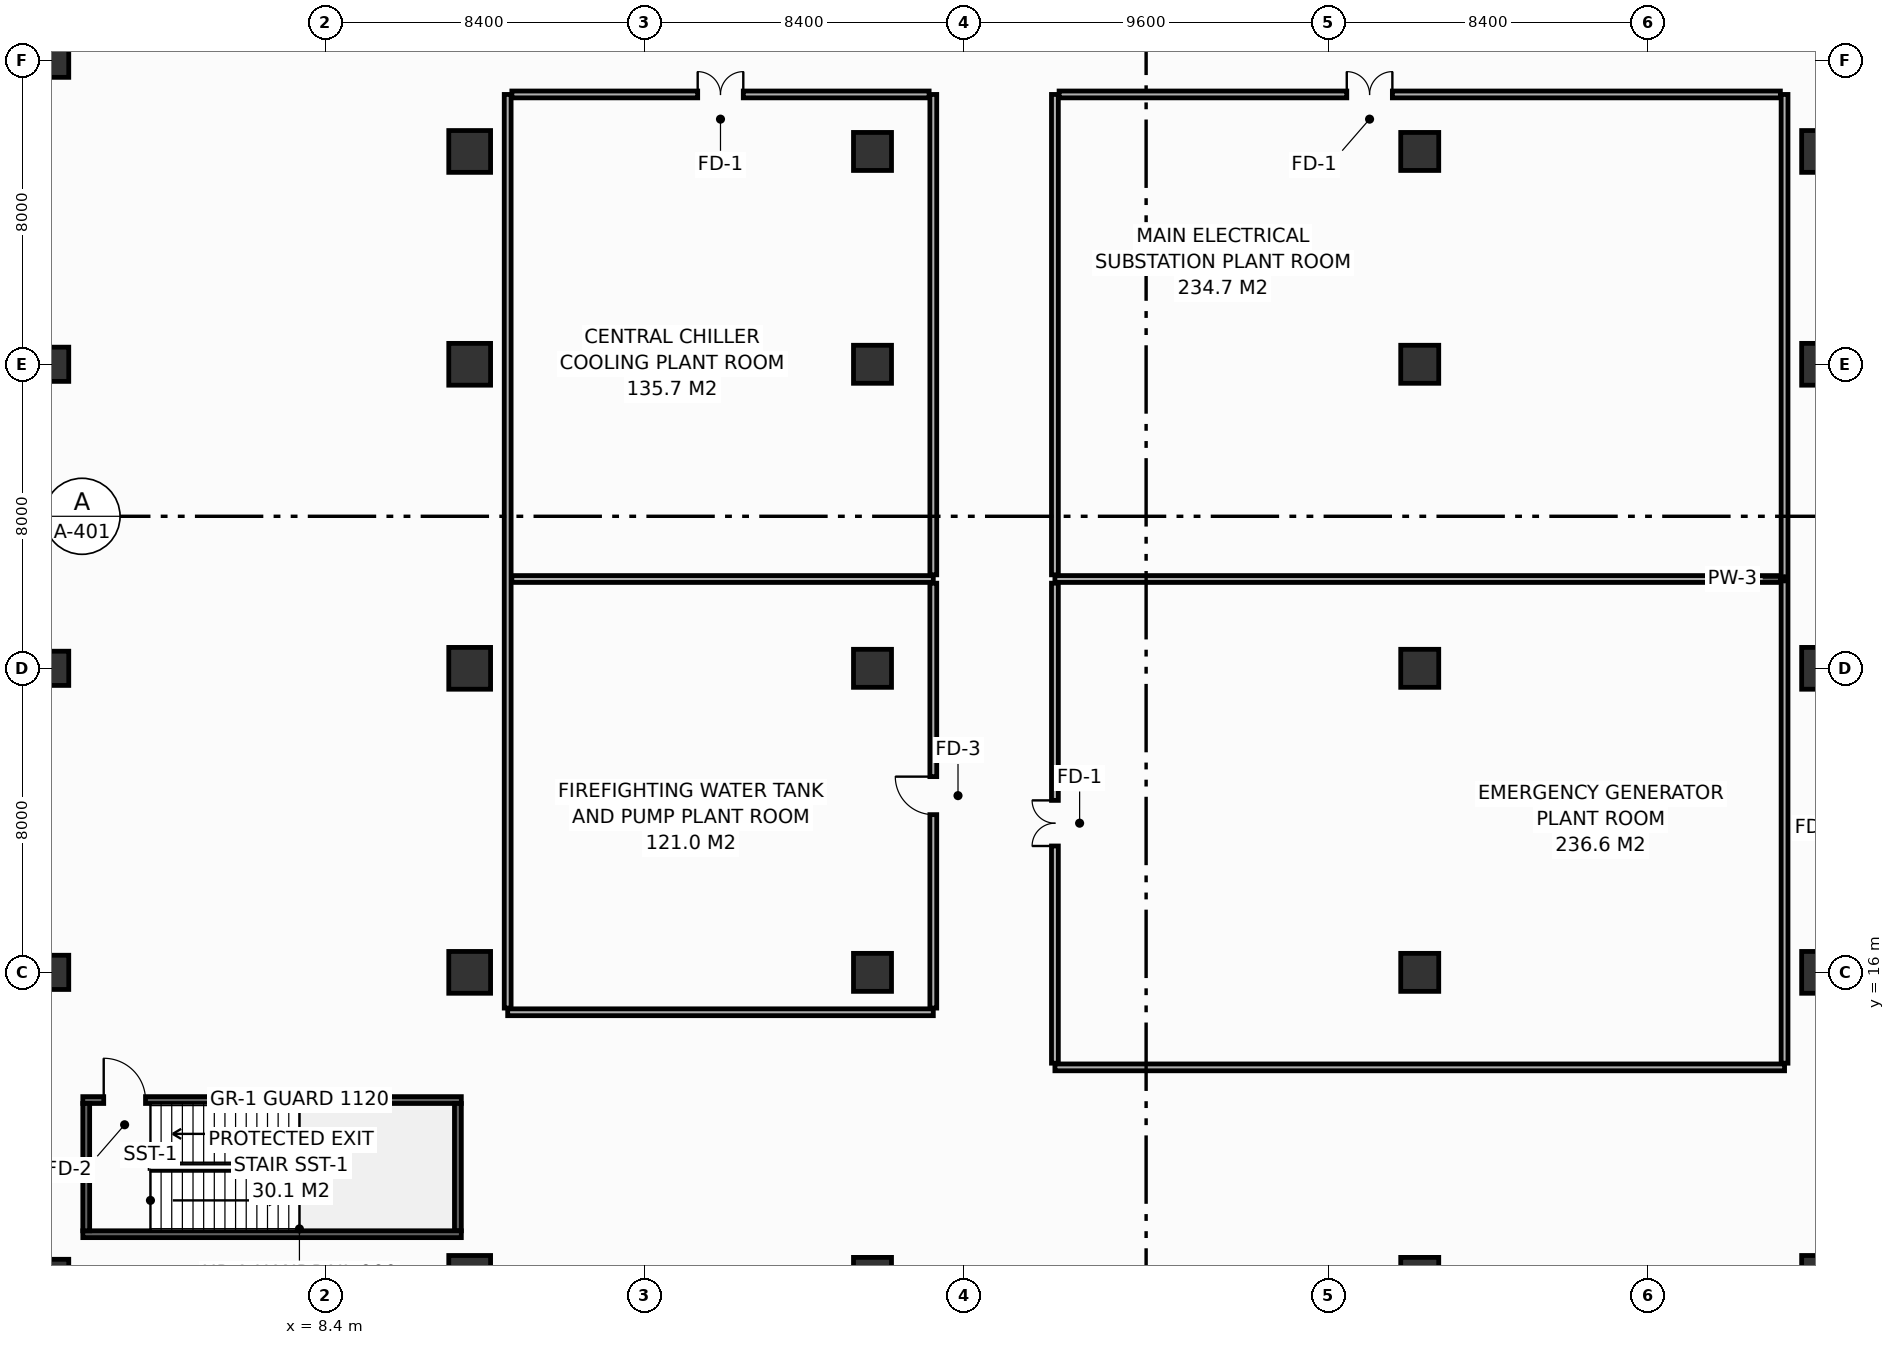
"""IFC4 building model, lengths in metres.
Left out: names, types, materials, properties, quantities, classifications, styles, units other than length and angle.
Written with IfcOpenShell. Run it as: python <this file> out.ifc"""

import sys

from ifc_helpers import new_model, si_unit, direction, frame, frame_2d, origin, origin_2d, place, context, subcontext, project, spatial, rectangle, extrude, element, fill, save


model = new_model("IFC4")
c1 = context("Model", 3, precision=1e-05, world=origin(), true_north=direction((0.0, 1.0)))
c2 = subcontext(c1, "Body", "Model", "MODEL_VIEW")
j1 = project(units=[si_unit("LENGTHUNIT", "METRE"), si_unit("PLANEANGLEUNIT", "RADIAN")], contexts=[c1])
p1 = place(None, origin())
s1 = spatial("IfcSite", under=j1, at=p1, CompositionType="ELEMENT")
p2 = place(p1, origin())
s2 = spatial("IfcBuilding", under=s1, at=p2, CompositionType="ELEMENT")
p3 = place(p2, frame((0.0, 0.0, -10.8)))
s3 = spatial("IfcBuildingStorey", under=s2, at=p3, CompositionType="ELEMENT", Elevation=-10.8)
p4 = place(p3, frame((12.2, 8.0, 0.0), z_axis=(0.0, 0.0, 1.0), x_axis=(1.0, 0.0, 0.0)))
e1 = element("IfcColumn", 1, at=p4, inside=s3, PredefinedType="COLUMN", context=c2, shape_type="SweptSolid", body=[
    extrude(rectangle(XDim=1.1, YDim=1.1, at=origin_2d()), origin(), (0.0, 0.0, 1.0), 5.4),
])
for number, where, z_axis, x_axis in (
    (2, (22.8, 8.0, 0.0), (0.0, 0.0, 1.0), (1.0, 0.0, 0.0)),
    (3, (37.2, 8.0, 0.0), (0.0, 0.0, 1.0), (1.0, 0.0, 0.0)),
):
    element("IfcColumn", number, at=place(p3, frame(where, z_axis=z_axis, x_axis=x_axis)), inside=s3, PredefinedType="COLUMN", context=c2, shape_type="SweptSolid", body=[
        extrude(rectangle(XDim=1.0, YDim=1.0, at=origin_2d()), origin(), (0.0, 0.0, 1.0), 5.4),
    ])
for number, where, z_axis, x_axis in (
    (4, (47.8, 8.0, 0.0), (0.0, 0.0, 1.0), (1.0, 0.0, 0.0)),
    (5, (12.2, 16.0, 0.0), (0.0, 0.0, 1.0), (1.0, 0.0, 0.0)),
):
    element("IfcColumn", number, at=place(p3, frame(where, z_axis=z_axis, x_axis=x_axis)), inside=s3, PredefinedType="COLUMN", context=c2, shape_type="SweptSolid", body=[
        extrude(rectangle(XDim=1.1, YDim=1.1, at=origin_2d()), origin(), (0.0, 0.0, 1.0), 5.4),
    ])
for number, where, z_axis, x_axis in (
    (6, (22.8, 16.0, 0.0), (0.0, 0.0, 1.0), (1.0, 0.0, 0.0)),
    (7, (37.2, 16.0, 0.0), (0.0, 0.0, 1.0), (1.0, 0.0, 0.0)),
):
    element("IfcColumn", number, at=place(p3, frame(where, z_axis=z_axis, x_axis=x_axis)), inside=s3, PredefinedType="COLUMN", context=c2, shape_type="SweptSolid", body=[
        extrude(rectangle(XDim=1.0, YDim=1.0, at=origin_2d()), origin(), (0.0, 0.0, 1.0), 5.4),
    ])
for number, where, z_axis, x_axis in (
    (8, (47.8, 16.0, 0.0), (0.0, 0.0, 1.0), (1.0, 0.0, 0.0)),
    (9, (12.2, 24.0, 0.0), (0.0, 0.0, 1.0), (1.0, 0.0, 0.0)),
):
    element("IfcColumn", number, at=place(p3, frame(where, z_axis=z_axis, x_axis=x_axis)), inside=s3, PredefinedType="COLUMN", context=c2, shape_type="SweptSolid", body=[
        extrude(rectangle(XDim=1.1, YDim=1.1, at=origin_2d()), origin(), (0.0, 0.0, 1.0), 5.4),
    ])
for number, where, z_axis, x_axis in (
    (10, (22.8, 24.0, 0.0), (0.0, 0.0, 1.0), (1.0, 0.0, 0.0)),
    (11, (37.2, 24.0, 0.0), (0.0, 0.0, 1.0), (1.0, 0.0, 0.0)),
):
    element("IfcColumn", number, at=place(p3, frame(where, z_axis=z_axis, x_axis=x_axis)), inside=s3, PredefinedType="COLUMN", context=c2, shape_type="SweptSolid", body=[
        extrude(rectangle(XDim=1.0, YDim=1.0, at=origin_2d()), origin(), (0.0, 0.0, 1.0), 5.4),
    ])
for number, where, z_axis, x_axis in (
    (12, (47.8, 24.0, 0.0), (0.0, 0.0, 1.0), (1.0, 0.0, 0.0)),
    (13, (12.2, 32.0, 0.0), (0.0, 0.0, 1.0), (1.0, 0.0, 0.0)),
):
    element("IfcColumn", number, at=place(p3, frame(where, z_axis=z_axis, x_axis=x_axis)), inside=s3, PredefinedType="COLUMN", context=c2, shape_type="SweptSolid", body=[
        extrude(rectangle(XDim=1.1, YDim=1.1, at=origin_2d()), origin(), (0.0, 0.0, 1.0), 5.4),
    ])
for number, where, z_axis, x_axis in (
    (14, (22.8, 32.0, 0.0), (0.0, 0.0, 1.0), (1.0, 0.0, 0.0)),
    (15, (37.2, 32.0, 0.0), (0.0, 0.0, 1.0), (1.0, 0.0, 0.0)),
):
    element("IfcColumn", number, at=place(p3, frame(where, z_axis=z_axis, x_axis=x_axis)), inside=s3, PredefinedType="COLUMN", context=c2, shape_type="SweptSolid", body=[
        extrude(rectangle(XDim=1.0, YDim=1.0, at=origin_2d()), origin(), (0.0, 0.0, 1.0), 5.4),
    ])
for number, where, z_axis, x_axis in (
    (16, (47.8, 32.0, 0.0), (0.0, 0.0, 1.0), (1.0, 0.0, 0.0)),
    (17, (12.2, 37.6, 0.0), (0.0, 0.0, 1.0), (1.0, 0.0, 0.0)),
):
    element("IfcColumn", number, at=place(p3, frame(where, z_axis=z_axis, x_axis=x_axis)), inside=s3, PredefinedType="COLUMN", context=c2, shape_type="SweptSolid", body=[
        extrude(rectangle(XDim=1.1, YDim=1.1, at=origin_2d()), origin(), (0.0, 0.0, 1.0), 5.4),
    ])
for number, where, z_axis, x_axis in (
    (18, (22.8, 37.6, 0.0), (0.0, 0.0, 1.0), (1.0, 0.0, 0.0)),
    (19, (37.2, 37.6, 0.0), (0.0, 0.0, 1.0), (1.0, 0.0, 0.0)),
):
    element("IfcColumn", number, at=place(p3, frame(where, z_axis=z_axis, x_axis=x_axis)), inside=s3, PredefinedType="COLUMN", context=c2, shape_type="SweptSolid", body=[
        extrude(rectangle(XDim=1.0, YDim=1.0, at=origin_2d()), origin(), (0.0, 0.0, 1.0), 5.4),
    ])
p5 = place(p3, frame((47.8, 37.6, 0.0), z_axis=(0.0, 0.0, 1.0), x_axis=(1.0, 0.0, 0.0)))
e20 = element("IfcColumn", 20, at=p5, inside=s3, PredefinedType="COLUMN", context=c2, shape_type="SweptSolid", body=[
    extrude(rectangle(XDim=1.1, YDim=1.1, at=origin_2d()), origin(), (0.0, 0.0, 1.0), 5.4),
])
for number, where, z_axis, x_axis in (
    (21, (1.2, 8.0, 0.0), (0.0, 0.0, 1.0), (1.0, 0.0, 0.0)),
    (22, (1.2, 16.0, 0.0), (0.0, 0.0, 1.0), (1.0, 0.0, 0.0)),
    (23, (1.2, 24.0, 0.0), (0.0, 0.0, 1.0), (1.0, 0.0, 0.0)),
    (24, (1.2, 32.0, 0.0), (0.0, 0.0, 1.0), (1.0, 0.0, 0.0)),
    (25, (1.2, 40.0, 0.0), (0.0, 0.0, 1.0), (1.0, 0.0, 0.0)),
):
    element("IfcColumn", number, at=place(p3, frame(where, z_axis=z_axis, x_axis=x_axis)), inside=s3, PredefinedType="COLUMN", context=c2, shape_type="SweptSolid", body=[
        extrude(rectangle(XDim=0.9, YDim=0.9, at=origin_2d()), origin(), (0.0, 0.0, 1.0), 5.4),
    ])
p6 = place(p3, frame((2.02, 12.64, 0.0), z_axis=(0.0, 0.0, 1.0), x_axis=(1.0, 0.0, 0.0)))
e26 = element("IfcWall", 26, at=p6, inside=s3, PredefinedType="SHEAR", context=c2, shape_type="SweptSolid", body=[
    extrude(rectangle(XDim=9.96, YDim=0.18, at=frame_2d((4.98, 0.0))), origin(), (0.0, 0.0, 1.0), 5.05),
])
p7 = place(p6, frame((0.55, 0.0, 0.0)))
e27 = element("IfcOpeningElement", 27, at=p7, cuts=e26, PredefinedType="OPENING", context=c2, shape_type="SweptSolid", body=[
    extrude(rectangle(XDim=1.1, YDim=2.15, at=frame_2d((0.55, 1.075))), frame((0.0, 0.1, 0.0), z_axis=(0.0, -1.0, 0.0), x_axis=(1.0, 0.0, 0.0)), (0.0, 0.0, 1.0), 0.2),
])
p8 = place(p3, frame((11.89, 12.55, 0.0), z_axis=(0.0, 0.0, 1.0), x_axis=(0.0, -1.0, 0.0)))
e28 = element("IfcWall", 28, at=p8, inside=s3, PredefinedType="SHEAR", context=c2, shape_type="SweptSolid", body=[
    extrude(rectangle(XDim=3.35, YDim=0.18, at=frame_2d((1.675, 0.0))), origin(), (0.0, 0.0, 1.0), 5.05),
])
p9 = place(p3, frame((11.98, 9.11, 0.0), z_axis=(0.0, 0.0, 1.0), x_axis=(-1.0, 0.0, 0.0)))
e29 = element("IfcWall", 29, at=p9, inside=s3, PredefinedType="SHEAR", context=c2, shape_type="SweptSolid", body=[
    extrude(rectangle(XDim=9.96, YDim=0.18, at=frame_2d((4.98, 0.0))), origin(), (0.0, 0.0, 1.0), 5.05),
])
p10 = place(p3, frame((2.11, 9.2, 0.0), z_axis=(0.0, 0.0, 1.0), x_axis=(0.0, 1.0, 0.0)))
e30 = element("IfcWall", 30, at=p10, inside=s3, PredefinedType="SHEAR", context=c2, shape_type="SweptSolid", body=[
    extrude(rectangle(XDim=3.35, YDim=0.18, at=frame_2d((1.675, 0.0))), origin(), (0.0, 0.0, 1.0), 5.05),
])
p11 = place(p3, frame((13.2, 14.95, 0.0), z_axis=(0.0, 0.0, 1.0), x_axis=(1.0, 0.0, 0.0)))
e31 = element("IfcWall", 31, at=p11, inside=s3, PredefinedType="PARTITIONING", context=c2, shape_type="SweptSolid", body=[
    extrude(rectangle(XDim=11.2, YDim=0.18, at=frame_2d((5.6, 0.0))), origin(), (0.0, 0.0, 1.0), 4.135),
])
p12 = place(p3, frame((13.2, 15.06, 0.0), z_axis=(0.0, 0.0, 1.0), x_axis=(0.0, 1.0, 0.0)))
e32 = element("IfcWall", 32, at=p12, inside=s3, PredefinedType="PARTITIONING", context=c2, shape_type="SweptSolid", body=[
    extrude(rectangle(XDim=24.04, YDim=0.18, at=frame_2d((12.02, 0.0))), origin(), (0.0, 0.0, 1.0), 4.135),
])
p13 = place(p3, frame((13.31, 26.35, 0.0), z_axis=(0.0, 0.0, 1.0), x_axis=(1.0, 0.0, 0.0)))
e33 = element("IfcWall", 33, at=p13, inside=s3, PredefinedType="PARTITIONING", context=c2, shape_type="SweptSolid", body=[
    extrude(rectangle(XDim=11.09, YDim=0.18, at=frame_2d((5.545, 0.0))), origin(), (0.0, 0.0, 1.0), 4.135),
])
p14 = place(p3, frame((24.4, 26.46, 0.0), z_axis=(0.0, 0.0, 1.0), x_axis=(0.0, 1.0, 0.0)))
e34 = element("IfcWall", 34, at=p14, inside=s3, PredefinedType="PARTITIONING", context=c2, shape_type="SweptSolid", body=[
    extrude(rectangle(XDim=12.64, YDim=0.18, at=frame_2d((6.32, 0.0))), origin(), (0.0, 0.0, 1.0), 4.135),
])
p15 = place(p3, frame((24.4, 15.06, 0.0), z_axis=(0.0, 0.0, 1.0), x_axis=(0.0, 1.0, 0.0)))
e35 = element("IfcWall", 35, at=p15, inside=s3, PredefinedType="PARTITIONING", context=c2, shape_type="SweptSolid", body=[
    extrude(rectangle(XDim=11.18, YDim=0.18, at=frame_2d((5.59, 0.0))), origin(), (0.0, 0.0, 1.0), 4.135),
])
p16 = place(p15, frame((5.09, 0.0, 0.0)))
e36 = element("IfcOpeningElement", 36, at=p16, cuts=e35, PredefinedType="OPENING", context=c2, shape_type="SweptSolid", body=[
    extrude(rectangle(XDim=1.0, YDim=2.15, at=frame_2d((0.5, 1.075))), frame((0.0, 0.1, 0.0), z_axis=(0.0, -1.0, 0.0), x_axis=(1.0, 0.0, 0.0)), (0.0, 0.0, 1.0), 0.2),
])
p17 = place(p3, frame((13.31, 39.1, 0.0), z_axis=(0.0, 0.0, 1.0), x_axis=(1.0, 0.0, 0.0)))
e37 = element("IfcWall", 37, at=p17, inside=s3, PredefinedType="PARTITIONING", context=c2, shape_type="SweptSolid", body=[
    extrude(rectangle(XDim=10.98, YDim=0.18, at=frame_2d((5.49, 0.0))), origin(), (0.0, 0.0, 1.0), 4.135),
])
p18 = place(p17, frame((4.89, 0.0, 0.0)))
e38 = element("IfcOpeningElement", 38, at=p18, cuts=e37, PredefinedType="OPENING", context=c2, shape_type="SweptSolid", body=[
    extrude(rectangle(XDim=1.2, YDim=2.15, at=frame_2d((0.6, 1.075))), frame((0.0, 0.1, 0.0), z_axis=(0.0, -1.0, 0.0), x_axis=(1.0, 0.0, 0.0)), (0.0, 0.0, 1.0), 0.2),
])
p19 = place(p3, frame((27.6, 13.5, 0.0), z_axis=(0.0, 0.0, 1.0), x_axis=(1.0, 0.0, 0.0)))
e39 = element("IfcWall", 39, at=p19, inside=s3, PredefinedType="PARTITIONING", context=c2, shape_type="SweptSolid", body=[
    extrude(rectangle(XDim=19.2, YDim=0.18, at=frame_2d((9.6, 0.0))), origin(), (0.0, 0.0, 1.0), 4.135),
])
p20 = place(p3, frame((46.8, 13.61, 0.0), z_axis=(0.0, 0.0, 1.0), x_axis=(0.0, 1.0, 0.0)))
e40 = element("IfcWall", 40, at=p20, inside=s3, PredefinedType="PARTITIONING", context=c2, shape_type="SweptSolid", body=[
    extrude(rectangle(XDim=25.49, YDim=0.18, at=frame_2d((12.745, 0.0))), origin(), (0.0, 0.0, 1.0), 4.135),
])
p21 = place(p3, frame((27.6, 26.35, 0.0), z_axis=(0.0, 0.0, 1.0), x_axis=(1.0, 0.0, 0.0)))
e41 = element("IfcWall", 41, at=p21, inside=s3, PredefinedType="PARTITIONING", context=c2, shape_type="SweptSolid", body=[
    extrude(rectangle(XDim=19.09, YDim=0.18, at=frame_2d((9.545, 0.0))), origin(), (0.0, 0.0, 1.0), 4.135),
])
p22 = place(p3, frame((27.6, 26.46, 0.0), z_axis=(0.0, 0.0, 1.0), x_axis=(0.0, 1.0, 0.0)))
e42 = element("IfcWall", 42, at=p22, inside=s3, PredefinedType="PARTITIONING", context=c2, shape_type="SweptSolid", body=[
    extrude(rectangle(XDim=12.64, YDim=0.18, at=frame_2d((6.32, 0.0))), origin(), (0.0, 0.0, 1.0), 4.135),
])
p23 = place(p3, frame((27.71, 39.1, 0.0), z_axis=(0.0, 0.0, 1.0), x_axis=(1.0, 0.0, 0.0)))
e43 = element("IfcWall", 43, at=p23, inside=s3, PredefinedType="PARTITIONING", context=c2, shape_type="SweptSolid", body=[
    extrude(rectangle(XDim=18.98, YDim=0.18, at=frame_2d((9.49, 0.0))), origin(), (0.0, 0.0, 1.0), 4.135),
])
p24 = place(p23, frame((7.57, 0.0, 0.0)))
e44 = element("IfcOpeningElement", 44, at=p24, cuts=e43, PredefinedType="OPENING", context=c2, shape_type="SweptSolid", body=[
    extrude(rectangle(XDim=1.2, YDim=2.15, at=frame_2d((0.6, 1.075))), frame((0.0, 0.1, 0.0), z_axis=(0.0, -1.0, 0.0), x_axis=(1.0, 0.0, 0.0)), (0.0, 0.0, 1.0), 0.2),
])
p25 = place(p3, frame((27.6, 13.61, 0.0), z_axis=(0.0, 0.0, 1.0), x_axis=(0.0, 1.0, 0.0)))
e45 = element("IfcWall", 45, at=p25, inside=s3, PredefinedType="PARTITIONING", context=c2, shape_type="SweptSolid", body=[
    extrude(rectangle(XDim=12.63, YDim=0.18, at=frame_2d((6.315, 0.0))), origin(), (0.0, 0.0, 1.0), 4.135),
])
p26 = place(p25, frame((5.715, 0.0, 0.0)))
e46 = element("IfcOpeningElement", 46, at=p26, cuts=e45, PredefinedType="OPENING", context=c2, shape_type="SweptSolid", body=[
    extrude(rectangle(XDim=1.2, YDim=2.15, at=frame_2d((0.6, 1.075))), frame((0.0, 0.1, 0.0), z_axis=(0.0, -1.0, 0.0), x_axis=(1.0, 0.0, 0.0)), (0.0, 0.0, 1.0), 0.2),
])
p27 = place(p7, origin())
e47 = element("IfcDoor", 47, at=p27, inside=s3, OperationType="SINGLE_SWING_LEFT", PredefinedType="DOOR", context=c2, shape_type="SweptSolid", body=[
    extrude(rectangle(XDim=1.1, YDim=2.15, at=frame_2d((0.55, 1.075))), frame((0.0, 0.025, 0.0), z_axis=(0.0, -1.0, 0.0), x_axis=(1.0, 0.0, 0.0)), (0.0, 0.0, 1.0), 0.05),
])
fill(e27, e47)
p28 = place(p16, origin())
e48 = element("IfcDoor", 48, at=p28, inside=s3, OperationType="SINGLE_SWING_RIGHT", PredefinedType="DOOR", context=c2, shape_type="SweptSolid", body=[
    extrude(rectangle(XDim=1.0, YDim=2.15, at=frame_2d((0.5, 1.075))), frame((0.0, 0.025, 0.0), z_axis=(0.0, -1.0, 0.0), x_axis=(1.0, 0.0, 0.0)), (0.0, 0.0, 1.0), 0.05),
])
fill(e36, e48)
p29 = place(p18, origin())
e49 = element("IfcDoor", 49, at=p29, inside=s3, OperationType="DOUBLE_DOOR_SINGLE_SWING", PredefinedType="DOOR", context=c2, shape_type="SweptSolid", body=[
    extrude(rectangle(XDim=1.2, YDim=2.15, at=frame_2d((0.6, 1.075))), frame((0.0, 0.025, 0.0), z_axis=(0.0, -1.0, 0.0), x_axis=(1.0, 0.0, 0.0)), (0.0, 0.0, 1.0), 0.05),
])
fill(e38, e49)
p30 = place(p24, origin())
e50 = element("IfcDoor", 50, at=p30, inside=s3, OperationType="DOUBLE_DOOR_SINGLE_SWING", PredefinedType="DOOR", context=c2, shape_type="SweptSolid", body=[
    extrude(rectangle(XDim=1.2, YDim=2.15, at=frame_2d((0.6, 1.075))), frame((0.0, 0.025, 0.0), z_axis=(0.0, -1.0, 0.0), x_axis=(1.0, 0.0, 0.0)), (0.0, 0.0, 1.0), 0.05),
])
fill(e44, e50)
p31 = place(p26, origin())
e51 = element("IfcDoor", 51, at=p31, inside=s3, OperationType="DOUBLE_DOOR_SINGLE_SWING", PredefinedType="DOOR", context=c2, shape_type="SweptSolid", body=[
    extrude(rectangle(XDim=1.2, YDim=2.15, at=frame_2d((0.6, 1.075))), frame((0.0, 0.025, 0.0), z_axis=(0.0, -1.0, 0.0), x_axis=(1.0, 0.0, 0.0)), (0.0, 0.0, 1.0), 0.05),
])
fill(e46, e51)
save(model, sys.argv[1])
